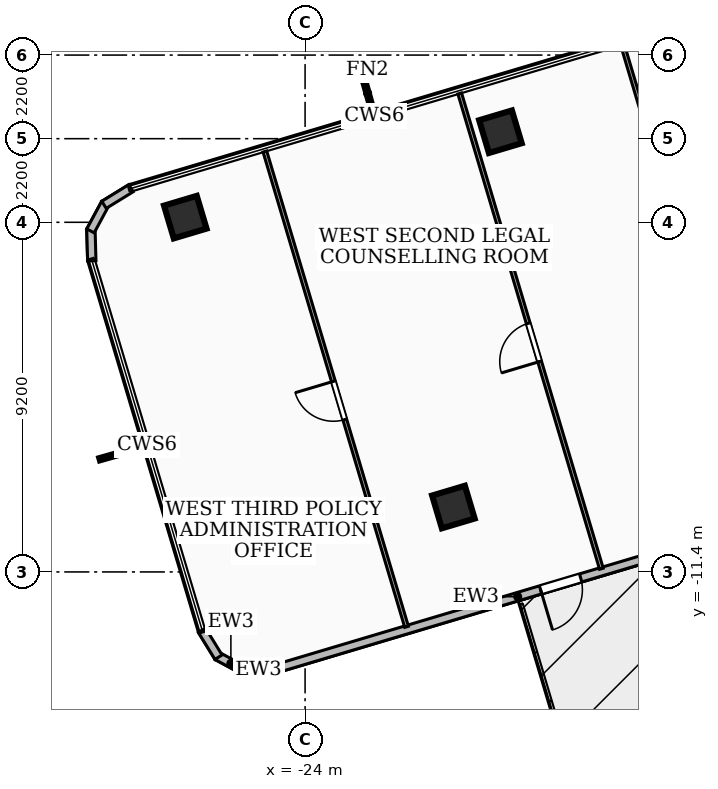
"""IFC4 building model, lengths in metres.
Left out: names, types, materials, properties, quantities, classifications, styles, units other than length and angle.
Written with IfcOpenShell. Run it as: python <this file> out.ifc"""

import sys

from ifc_helpers import new_model, si_unit, direction, frame, frame_2d, origin, origin_2d, place, context, subcontext, project, spatial, rectangle, extrude, element, fill, save


model = new_model("IFC4")
c1 = context("Model", 3, precision=1e-05, world=origin(), true_north=direction((0.0, 1.0)))
c2 = subcontext(c1, "Body", "Model", "MODEL_VIEW")
j1 = project(units=[si_unit("LENGTHUNIT", "METRE"), si_unit("PLANEANGLEUNIT", "RADIAN")], contexts=[c1])
p1 = place(None, origin())
s1 = spatial("IfcSite", under=j1, at=p1, CompositionType="ELEMENT")
p2 = place(p1, origin())
s2 = spatial("IfcBuilding", under=s1, at=p2, CompositionType="ELEMENT")
p3 = place(p2, frame((0.0, 0.0, 141.48)))
s3 = spatial("IfcBuildingStorey", under=s2, at=p3, CompositionType="ELEMENT", Elevation=141.48)
for number, where, z_axis, x_axis in (
    (1, (-18.86, 0.183, 0.0), (0.0, 0.0, 1.0), (0.958, 0.286, 0.0)),
    (2, (-27.153, -2.064, 0.0), (0.0, 0.0, 1.0), (0.958, 0.286, 0.0)),
    (3, (-20.098, -9.692, 0.0), (0.0, 0.0, 1.0), (0.958, 0.286, 0.0)),
):
    element("IfcColumn", number, at=place(p3, frame(where, z_axis=z_axis, x_axis=x_axis)), inside=s3, PredefinedType="COLUMN", context=c2, shape_type="SweptSolid", body=[
        extrude(rectangle(XDim=0.9, YDim=0.9, at=origin_2d()), origin(), (0.0, 0.0, 1.0), 3.6),
    ])
p4 = place(p3, frame((-11.957, -10.129, 0.0), z_axis=(0.0, 0.0, 1.0), x_axis=(-0.958343962332, -0.285616613419, 0.0)))
e4 = element("IfcWall", 4, at=p4, inside=s3, PredefinedType="SOLIDWALL", context=c2, shape_type="SweptSolid", body=[
    extrude(rectangle(XDim=13.458, YDim=0.22, at=frame_2d((6.729, 0.0))), origin(), (0.0, 0.0, 1.0), 2.7),
])
p5 = place(p4, frame((5.0, 0.0, 0.0)))
e5 = element("IfcOpeningElement", 5, at=p5, cuts=e4, PredefinedType="OPENING", context=c2, shape_type="SweptSolid", body=[
    extrude(rectangle(XDim=1.1, YDim=2.1, at=frame_2d((0.55, 1.05))), frame((0.0, 0.12, 0.0), z_axis=(0.0, -1.0, 0.0), x_axis=(1.0, 0.0, 0.0)), (0.0, 0.0, 1.0), 0.24),
])
p6 = place(p3, frame((-24.806, -13.965, 0.0), z_axis=(0.0, 0.0, 1.0), x_axis=(-0.999587773882, -0.028710317069, 0.0)))
e6 = element("IfcWall", 6, at=p6, inside=s3, PredefinedType="SOLIDWALL", context=c2, shape_type="SweptSolid", body=[
    extrude(rectangle(XDim=0.833, YDim=0.22, at=frame_2d((0.417, 0.0))), origin(), (0.0, 0.0, 1.0), 3.32),
])
p7 = place(p3, frame((-25.592, -14.0, 0.0), z_axis=(0.0, 0.0, 1.0), x_axis=(-0.879608832869, 0.47569769932, 0.0)))
e7 = element("IfcWall", 7, at=p7, inside=s3, PredefinedType="SOLIDWALL", context=c2, shape_type="SweptSolid", body=[
    extrude(rectangle(XDim=0.82, YDim=0.22, at=frame_2d((0.41, 0.0))), origin(), (0.0, 0.0, 1.0), 3.32),
])
p8 = place(p3, frame((-26.278, -13.643, 0.0), z_axis=(0.0, 0.0, 1.0), x_axis=(-0.524195456684, 0.851597982144, 0.0)))
e8 = element("IfcWall", 8, at=p8, inside=s3, PredefinedType="SOLIDWALL", context=c2, shape_type="SweptSolid", body=[
    extrude(rectangle(XDim=0.834, YDim=0.22, at=frame_2d((0.417, 0.0))), origin(), (0.0, 0.0, 1.0), 3.32),
])
p9 = place(p3, frame((-29.613, -3.213, 0.0), z_axis=(0.0, 0.0, 1.0), x_axis=(-0.027507151941, 0.999621606705, 0.0)))
e9 = element("IfcWall", 9, at=p9, inside=s3, PredefinedType="SOLIDWALL", context=c2, shape_type="SweptSolid", body=[
    extrude(rectangle(XDim=0.834, YDim=0.22, at=frame_2d((0.417, 0.0))), origin(), (0.0, 0.0, 1.0), 3.32),
])
p10 = place(p3, frame((-29.647, -2.426, 0.0), z_axis=(0.0, 0.0, 1.0), x_axis=(0.474775054815, 0.880107179453, 0.0)))
e10 = element("IfcWall", 10, at=p10, inside=s3, PredefinedType="SOLIDWALL", context=c2, shape_type="SweptSolid", body=[
    extrude(rectangle(XDim=0.819, YDim=0.22, at=frame_2d((0.41, 0.0))), origin(), (0.0, 0.0, 1.0), 3.32),
])
p11 = place(p3, frame((-29.291, -1.74, 0.0), z_axis=(0.0, 0.0, 1.0), x_axis=(0.851597982144, 0.524195456684, 0.0)))
e11 = element("IfcWall", 11, at=p11, inside=s3, PredefinedType="SOLIDWALL", context=c2, shape_type="SweptSolid", body=[
    extrude(rectangle(XDim=0.834, YDim=0.22, at=frame_2d((0.417, 0.0))), origin(), (0.0, 0.0, 1.0), 3.32),
])
p12 = place(p3, frame((-10.655, -14.279, 0.0), z_axis=(0.0, 0.0, 1.0), x_axis=(-0.285665949025, 0.958329257389, 0.0)))
e12 = element("IfcWall", 12, at=p12, inside=s3, PredefinedType="PARTITIONING", context=c2, shape_type="SweptSolid", body=[
    extrude(rectangle(XDim=20.66, YDim=0.1, at=frame_2d((10.33, 0.0))), origin(), (0.0, 0.0, 1.0), 2.55),
])
p13 = place(p12, frame((10.04, 0.0, 0.0)))
e13 = element("IfcOpeningElement", 13, at=p13, cuts=e12, PredefinedType="OPENING", context=c2, shape_type="SweptSolid", body=[
    extrude(rectangle(XDim=1.2, YDim=2.1, at=frame_2d((0.6, 1.05))), frame((0.0, 0.06, 0.0), z_axis=(0.0, -1.0, 0.0), x_axis=(1.0, 0.0, 0.0)), (0.0, 0.0, 1.0), 0.12),
])
p14 = place(p3, frame((-16.203, -11.316, 0.0), z_axis=(0.0, 0.0, 1.0), x_axis=(-0.285679130118, 0.958325328171, 0.0)))
e14 = element("IfcWall", 14, at=p14, inside=s3, PredefinedType="PARTITIONING", context=c2, shape_type="SweptSolid", body=[
    extrude(rectangle(XDim=13.05, YDim=0.1, at=frame_2d((6.525, 0.0))), origin(), (0.0, 0.0, 1.0), 2.55),
])
p15 = place(p14, frame((5.689, 0.0, 0.0)))
e15 = element("IfcOpeningElement", 15, at=p15, cuts=e14, PredefinedType="OPENING", context=c2, shape_type="SweptSolid", body=[
    extrude(rectangle(XDim=1.05, YDim=2.08, at=frame_2d((0.525, 1.04))), frame((0.0, 0.06, 0.0), z_axis=(0.0, -1.0, 0.0), x_axis=(1.0, 0.0, 0.0)), (0.0, 0.0, 1.0), 0.12),
])
p16 = place(p3, frame((-21.33, -12.844, 0.0), z_axis=(0.0, 0.0, 1.0), x_axis=(-0.285674008308, 0.958326854981, 0.0)))
e16 = element("IfcWall", 16, at=p16, inside=s3, PredefinedType="PARTITIONING", context=c2, shape_type="SweptSolid", body=[
    extrude(rectangle(XDim=13.05, YDim=0.1, at=frame_2d((6.525, 0.0))), origin(), (0.0, 0.0, 1.0), 2.55),
])
p17 = place(p16, frame((5.69, 0.0, 0.0)))
e17 = element("IfcOpeningElement", 17, at=p17, cuts=e16, PredefinedType="OPENING", context=c2, shape_type="SweptSolid", body=[
    extrude(rectangle(XDim=1.05, YDim=2.08, at=frame_2d((0.525, 1.04))), frame((0.0, 0.06, 0.0), z_axis=(0.0, -1.0, 0.0), x_axis=(1.0, 0.0, 0.0)), (0.0, 0.0, 1.0), 0.12),
])
p18 = place(p5, origin())
e18 = element("IfcDoor", 18, at=p18, inside=s3, OperationType="SINGLE_SWING_RIGHT", PredefinedType="DOOR", context=c2, shape_type="SweptSolid", body=[
    extrude(rectangle(XDim=1.1, YDim=2.1, at=frame_2d((0.55, 1.05))), frame((0.0, 0.025, 0.0), z_axis=(0.0, -1.0, 0.0), x_axis=(1.0, 0.0, 0.0)), (0.0, 0.0, 1.0), 0.05),
])
fill(e5, e18)
p19 = place(p15, origin())
e19 = element("IfcDoor", 19, at=p19, inside=s3, OperationType="SINGLE_SWING_LEFT", PredefinedType="DOOR", context=c2, shape_type="SweptSolid", body=[
    extrude(rectangle(XDim=1.05, YDim=2.08, at=frame_2d((0.525, 1.04))), frame((0.0, 0.025, 0.0), z_axis=(0.0, -1.0, 0.0), x_axis=(1.0, 0.0, 0.0)), (0.0, 0.0, 1.0), 0.05),
])
fill(e15, e19)
p20 = place(p17, origin())
e20 = element("IfcDoor", 20, at=p20, inside=s3, OperationType="SINGLE_SWING_RIGHT", PredefinedType="DOOR", context=c2, shape_type="SweptSolid", body=[
    extrude(rectangle(XDim=1.05, YDim=2.08, at=frame_2d((0.525, 1.04))), frame((0.0, 0.025, 0.0), z_axis=(0.0, -1.0, 0.0), x_axis=(1.0, 0.0, 0.0)), (0.0, 0.0, 1.0), 0.05),
])
fill(e17, e20)
save(model, sys.argv[1])
